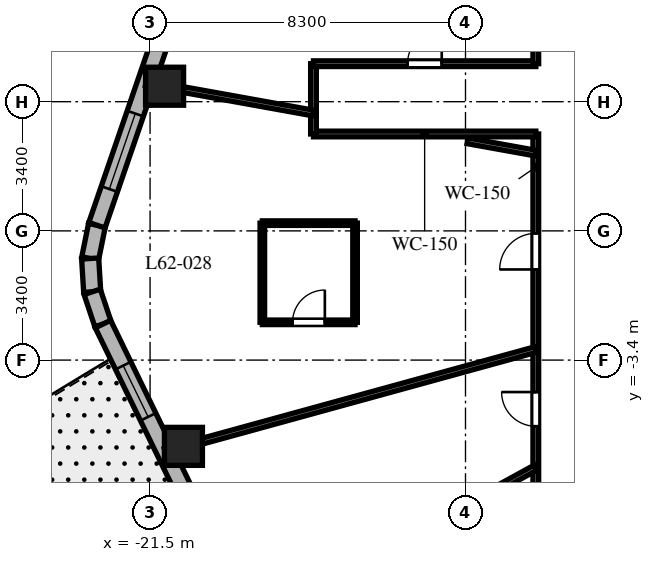
"""IFC4 building model, lengths in metres.
Left out: names, types, materials, properties, quantities, classifications, styles, units other than length and angle.
Written with IfcOpenShell. Run it as: python <this file> out.ifc"""

import sys

from ifc_helpers import new_model, si_unit, direction, frame, frame_2d, origin, origin_2d, place, context, subcontext, project, spatial, rectangle, extrude, element, fill, save


model = new_model("IFC4")
c1 = context("Model", 3, precision=1e-05, world=origin(), true_north=direction((0.0, 1.0)))
c2 = subcontext(c1, "Body", "Model", "MODEL_VIEW")
j1 = project(units=[si_unit("LENGTHUNIT", "METRE"), si_unit("PLANEANGLEUNIT", "RADIAN")], contexts=[c1])
p1 = place(None, origin())
s1 = spatial("IfcSite", under=j1, at=p1, CompositionType="ELEMENT")
p2 = place(p1, origin())
s2 = spatial("IfcBuilding", under=s1, at=p2, CompositionType="ELEMENT")
p3 = place(p2, frame((0.0, 0.0, 248.3)))
s3 = spatial("IfcBuildingStorey", under=s2, at=p3, CompositionType="ELEMENT", Elevation=248.3)
for number, where, z_axis, x_axis in (
    (1, (-21.118, 3.807, 0.0), (0.0, 0.0, 1.0), (1.0, 0.0, 0.0)),
    (2, (-20.622, -5.67, 0.0), (0.0, 0.0, 1.0), (1.0, 0.0, 0.0)),
):
    element("IfcColumn", number, at=place(p3, frame(where, z_axis=z_axis, x_axis=x_axis)), inside=s3, PredefinedType="COLUMN", context=c2, shape_type="SweptSolid", body=[
        extrude(rectangle(XDim=1.0, YDim=1.0, at=origin_2d()), origin(), (0.0, 0.0, 1.0), 3.8),
    ])
p4 = place(p3, frame((-22.898, 0.15, 0.0), z_axis=(0.0, 0.0, 1.0), x_axis=(-0.199055826889, -0.979988151858, 0.0)))
e3 = element("IfcWall", 3, at=p4, inside=s3, PredefinedType="SOLIDWALL", context=c2, shape_type="SweptSolid", body=[
    extrude(rectangle(XDim=0.894, YDim=0.45, at=frame_2d((0.447, 0.0))), origin(), (0.0, 0.0, 1.0), 3.5),
])
p5 = place(p3, frame((-23.076, -0.727, 0.0), z_axis=(0.0, 0.0, 1.0), x_axis=(0.060805222108, -0.998149650586, 0.0)))
e4 = element("IfcWall", 4, at=p5, inside=s3, PredefinedType="SOLIDWALL", context=c2, shape_type="SweptSolid", body=[
    extrude(rectangle(XDim=0.879, YDim=0.45, at=frame_2d((0.44, 0.0))), origin(), (0.0, 0.0, 1.0), 3.5),
])
p6 = place(p3, frame((-23.023, -1.604, 0.0), z_axis=(0.0, 0.0, 1.0), x_axis=(0.316801227695, -0.948491951537, 0.0)))
e5 = element("IfcWall", 5, at=p6, inside=s3, PredefinedType="SOLIDWALL", context=c2, shape_type="SweptSolid", body=[
    extrude(rectangle(XDim=0.894, YDim=0.45, at=frame_2d((0.447, 0.0))), origin(), (0.0, 0.0, 1.0), 3.5),
])
p7 = place(p3, frame((-16.324, 19.275, 0.0), z_axis=(0.0, 0.0, 1.0), x_axis=(-0.325083142304, -0.945685439557, 0.0)))
e6 = element("IfcWall", 6, at=p7, inside=s3, PredefinedType="SOLIDWALL", context=c2, shape_type="SweptSolid", body=[
    extrude(rectangle(XDim=20.224, YDim=0.45, at=frame_2d((10.112, 0.0))), origin(), (0.0, 0.0, 1.0), 3.5),
])
p8 = place(p7, frame((0.953, 0.0, 0.8)))
e7 = element("IfcOpeningElement", 7, at=p8, cuts=e6, PredefinedType="OPENING", context=c2, shape_type="SweptSolid", body=[
    extrude(rectangle(XDim=2.1, YDim=1.85, at=frame_2d((1.05, 0.925))), frame((0.0, 0.235, 0.0), z_axis=(0.0, -1.0, 0.0), x_axis=(1.0, 0.0, 0.0)), (0.0, 0.0, 1.0), 0.47),
])
p9 = place(p7, frame((6.268, 0.0, 0.8)))
e8 = element("IfcOpeningElement", 8, at=p9, cuts=e6, PredefinedType="OPENING", context=c2, shape_type="SweptSolid", body=[
    extrude(rectangle(XDim=2.1, YDim=1.85, at=frame_2d((1.05, 0.925))), frame((0.0, 0.235, 0.0), z_axis=(0.0, -1.0, 0.0), x_axis=(1.0, 0.0, 0.0)), (0.0, 0.0, 1.0), 0.47),
])
p10 = place(p7, frame((11.95, 0.0, 0.8)))
e9 = element("IfcOpeningElement", 9, at=p10, cuts=e6, PredefinedType="OPENING", context=c2, shape_type="SweptSolid", body=[
    extrude(rectangle(XDim=2.1, YDim=1.85, at=frame_2d((1.05, 0.925))), frame((0.0, 0.235, 0.0), z_axis=(0.0, -1.0, 0.0), x_axis=(1.0, 0.0, 0.0)), (0.0, 0.0, 1.0), 0.47),
])
p11 = place(p7, frame((17.118, 0.0, 0.8)))
e10 = element("IfcOpeningElement", 10, at=p11, cuts=e6, PredefinedType="OPENING", context=c2, shape_type="SweptSolid", body=[
    extrude(rectangle(XDim=2.1, YDim=1.85, at=frame_2d((1.05, 0.925))), frame((0.0, 0.235, 0.0), z_axis=(0.0, -1.0, 0.0), x_axis=(1.0, 0.0, 0.0)), (0.0, 0.0, 1.0), 0.47),
])
p12 = place(p3, frame((-22.74, -2.452, 0.0), z_axis=(0.0, 0.0, 1.0), x_axis=(0.437753424814, -0.899095066755, 0.0)))
e11 = element("IfcWall", 11, at=p12, inside=s3, PredefinedType="SOLIDWALL", context=c2, shape_type="SweptSolid", body=[
    extrude(rectangle(XDim=19.137, YDim=0.45, at=frame_2d((9.569, 0.0))), origin(), (0.0, 0.0, 1.0), 3.5),
])
p13 = place(p12, frame((4.763, 0.0, 0.0)))
e12 = element("IfcOpeningElement", 12, at=p13, cuts=e11, PredefinedType="OPENING", context=c2, shape_type="SweptSolid", body=[
    extrude(rectangle(XDim=0.95, YDim=2.15, at=frame_2d((0.475, 1.075))), frame((0.0, 0.235, 0.0), z_axis=(0.0, -1.0, 0.0), x_axis=(1.0, 0.0, 0.0)), (0.0, 0.0, 1.0), 0.47),
])
p14 = place(p12, frame((1.216, 0.0, 0.8)))
e13 = element("IfcOpeningElement", 13, at=p14, cuts=e11, PredefinedType="OPENING", context=c2, shape_type="SweptSolid", body=[
    extrude(rectangle(XDim=1.5, YDim=1.8, at=frame_2d((0.75, 0.9))), frame((0.0, 0.235, 0.0), z_axis=(0.0, -1.0, 0.0), x_axis=(1.0, 0.0, 0.0)), (0.0, 0.0, 1.0), 0.47),
])
p15 = place(p12, frame((6.461, 0.0, 0.8)))
e14 = element("IfcOpeningElement", 14, at=p15, cuts=e11, PredefinedType="OPENING", context=c2, shape_type="SweptSolid", body=[
    extrude(rectangle(XDim=1.5, YDim=1.8, at=frame_2d((0.75, 0.9))), frame((0.0, 0.235, 0.0), z_axis=(0.0, -1.0, 0.0), x_axis=(1.0, 0.0, 0.0)), (0.0, 0.0, 1.0), 0.47),
])
p16 = place(p12, frame((11.156, 0.0, 0.8)))
e15 = element("IfcOpeningElement", 15, at=p16, cuts=e11, PredefinedType="OPENING", context=c2, shape_type="SweptSolid", body=[
    extrude(rectangle(XDim=1.5, YDim=1.8, at=frame_2d((0.75, 0.9))), frame((0.0, 0.235, 0.0), z_axis=(0.0, -1.0, 0.0), x_axis=(1.0, 0.0, 0.0)), (0.0, 0.0, 1.0), 0.47),
])
p17 = place(p12, frame((16.473, 0.0, 0.8)))
e16 = element("IfcOpeningElement", 16, at=p17, cuts=e11, PredefinedType="OPENING", context=c2, shape_type="SweptSolid", body=[
    extrude(rectangle(XDim=1.5, YDim=1.8, at=frame_2d((0.75, 0.9))), frame((0.0, 0.235, 0.0), z_axis=(0.0, -1.0, 0.0), x_axis=(1.0, 0.0, 0.0)), (0.0, 0.0, 1.0), 0.47),
])
p18 = place(p3, frame((-11.35, -9.85, 0.0), z_axis=(0.0, 0.0, 1.0), x_axis=(0.0, 1.0, 0.0)))
e17 = element("IfcWall", 17, at=p18, inside=s3, PredefinedType="PARTITIONING", context=c2, shape_type="SweptSolid", body=[
    extrude(rectangle(XDim=12.4, YDim=0.15, at=frame_2d((6.2, 0.0))), origin(), (0.0, 0.0, 1.0), 2.99),
])
p19 = place(p18, frame((8.835, 0.0, 0.0)))
e18 = element("IfcOpeningElement", 18, at=p19, cuts=e17, PredefinedType="OPENING", context=c2, shape_type="SweptSolid", body=[
    extrude(rectangle(XDim=0.95, YDim=2.03, at=frame_2d((0.475, 1.015))), frame((0.0, 0.085, 0.0), z_axis=(0.0, -1.0, 0.0), x_axis=(1.0, 0.0, 0.0)), (0.0, 0.0, 1.0), 0.17),
])
p20 = place(p18, frame((4.709, 0.0, 0.0)))
e19 = element("IfcOpeningElement", 19, at=p20, cuts=e17, PredefinedType="OPENING", context=c2, shape_type="SweptSolid", body=[
    extrude(rectangle(XDim=0.9, YDim=2.03, at=frame_2d((0.45, 1.015))), frame((0.0, 0.085, 0.0), z_axis=(0.0, -1.0, 0.0), x_axis=(1.0, 0.0, 0.0)), (0.0, 0.0, 1.0), 0.17),
])
p21 = place(p18, frame((1.457, 0.0, 0.0)))
e20 = element("IfcOpeningElement", 20, at=p21, cuts=e17, PredefinedType="OPENING", context=c2, shape_type="SweptSolid", body=[
    extrude(rectangle(XDim=0.95, YDim=2.03, at=frame_2d((0.475, 1.015))), frame((0.0, 0.085, 0.0), z_axis=(0.0, -1.0, 0.0), x_axis=(1.0, 0.0, 0.0)), (0.0, 0.0, 1.0), 0.17),
])
p22 = place(p3, frame((-11.35, 2.55, 0.0), z_axis=(0.0, 0.0, 1.0), x_axis=(-1.0, 0.0, 0.0)))
e21 = element("IfcWall", 21, at=p22, inside=s3, PredefinedType="PARTITIONING", context=c2, shape_type="SweptSolid", body=[
    extrude(rectangle(XDim=5.85, YDim=0.15, at=frame_2d((2.925, 0.0))), origin(), (0.0, 0.0, 1.0), 2.94),
])
p23 = place(p3, frame((-17.2, 2.55, 0.0), z_axis=(0.0, 0.0, 1.0), x_axis=(0.0, 1.0, 0.0)))
e22 = element("IfcWall", 22, at=p23, inside=s3, PredefinedType="PARTITIONING", context=c2, shape_type="SweptSolid", body=[
    extrude(rectangle(XDim=1.85, YDim=0.15, at=frame_2d((0.925, 0.0))), origin(), (0.0, 0.0, 1.0), 2.94),
])
p24 = place(p3, frame((-17.2, 4.4, 0.0), z_axis=(0.0, 0.0, 1.0), x_axis=(1.0, 0.0, 0.0)))
e23 = element("IfcWall", 23, at=p24, inside=s3, PredefinedType="PARTITIONING", context=c2, shape_type="SweptSolid", body=[
    extrude(rectangle(XDim=5.85, YDim=0.15, at=frame_2d((2.925, 0.0))), origin(), (0.0, 0.0, 1.0), 2.94),
])
p25 = place(p24, frame((2.475, 0.0, 0.0)))
e24 = element("IfcOpeningElement", 24, at=p25, cuts=e23, PredefinedType="OPENING", context=c2, shape_type="SweptSolid", body=[
    extrude(rectangle(XDim=0.9, YDim=2.03, at=frame_2d((0.45, 1.015))), frame((0.0, 0.085, 0.0), z_axis=(0.0, -1.0, 0.0), x_axis=(1.0, 0.0, 0.0)), (0.0, 0.0, 1.0), 0.17),
])
p26 = place(p3, frame((-11.35, 4.4, 0.0), z_axis=(0.0, 0.0, 1.0), x_axis=(0.0, 1.0, 0.0)))
e25 = element("IfcWall", 25, at=p26, inside=s3, PredefinedType="PARTITIONING", context=c2, shape_type="SweptSolid", body=[
    extrude(rectangle(XDim=5.45, YDim=0.15, at=frame_2d((2.725, 0.0))), origin(), (0.0, 0.0, 1.0), 2.99),
])
p27 = place(p26, frame((2.694, 0.0, 0.0)))
e26 = element("IfcOpeningElement", 26, at=p27, cuts=e25, PredefinedType="OPENING", context=c2, shape_type="SweptSolid", body=[
    extrude(rectangle(XDim=0.95, YDim=2.03, at=frame_2d((0.475, 1.015))), frame((0.0, 0.085, 0.0), z_axis=(0.0, -1.0, 0.0), x_axis=(1.0, 0.0, 0.0)), (0.0, 0.0, 1.0), 0.17),
])
p28 = place(p3, frame((-11.35, 2.046, 0.0), z_axis=(0.0, 0.0, 1.0), x_axis=(-0.984127783205, 0.177461281195, 0.0)))
e27 = element("IfcWall", 27, at=p28, inside=s3, PredefinedType="PARTITIONING", context=c2, shape_type="SweptSolid", body=[
    extrude(rectangle(XDim=1.826, YDim=0.15, at=frame_2d((0.913, 0.0))), origin(), (0.0, 0.0, 1.0), 3.5),
])
p29 = place(p3, frame((-17.2, 3.101, 0.0), z_axis=(0.0, 0.0, 1.0), x_axis=(-0.98413465883, 0.177423147559, 0.0)))
e28 = element("IfcWall", 28, at=p29, inside=s3, PredefinedType="PARTITIONING", context=c2, shape_type="SweptSolid", body=[
    extrude(rectangle(XDim=4.482, YDim=0.15, at=frame_2d((2.241, 0.0))), origin(), (0.0, 0.0, 1.0), 2.74),
])
p30 = place(p3, frame((-11.35, -3.121, 0.0), z_axis=(0.0, 0.0, 1.0), x_axis=(-0.964212793822, -0.265129568758, 0.0)))
e29 = element("IfcWall", 29, at=p30, inside=s3, PredefinedType="PARTITIONING", context=c2, shape_type="SweptSolid", body=[
    extrude(rectangle(XDim=10.12, YDim=0.15, at=frame_2d((5.06, 0.0))), origin(), (0.0, 0.0, 1.0), 2.74),
])
p31 = place(p3, frame((-11.35, -6.227, 0.0), z_axis=(0.0, 0.0, 1.0), x_axis=(-0.876723190824, -0.480995266786, 0.0)))
e30 = element("IfcWall", 30, at=p31, inside=s3, PredefinedType="PARTITIONING", context=c2, shape_type="SweptSolid", body=[
    extrude(rectangle(XDim=8.598, YDim=0.15, at=frame_2d((4.299, 0.0))), origin(), (0.0, 0.0, 1.0), 2.74),
])
p32 = place(p3, frame((-18.546, -2.406, 0.0), z_axis=(0.0, 0.0, 1.0), x_axis=(1.0, 0.0, 0.0)))
e31 = element("IfcWall", 31, at=p32, inside=s3, PredefinedType="PARTITIONING", context=c2, shape_type="SweptSolid", body=[
    extrude(rectangle(XDim=2.44, YDim=0.12, at=frame_2d((1.22, 0.0))), origin(), (0.0, 0.0, 1.0), 2.94),
])
p33 = place(p32, frame((0.795, 0.0, 0.0)))
e32 = element("IfcOpeningElement", 32, at=p33, cuts=e31, PredefinedType="OPENING", context=c2, shape_type="SweptSolid", body=[
    extrude(rectangle(XDim=0.85, YDim=2.03, at=frame_2d((0.425, 1.015))), frame((0.0, 0.07, 0.0), z_axis=(0.0, -1.0, 0.0), x_axis=(1.0, 0.0, 0.0)), (0.0, 0.0, 1.0), 0.14),
])
p34 = place(p3, frame((-16.106, -2.406, 0.0), z_axis=(0.0, 0.0, 1.0), x_axis=(0.0, 1.0, 0.0)))
e33 = element("IfcWall", 33, at=p34, inside=s3, PredefinedType="PARTITIONING", context=c2, shape_type="SweptSolid", body=[
    extrude(rectangle(XDim=2.61, YDim=0.12, at=frame_2d((1.305, 0.0))), origin(), (0.0, 0.0, 1.0), 3.5),
])
p35 = place(p3, frame((-16.106, 0.204, 0.0), z_axis=(0.0, 0.0, 1.0), x_axis=(-1.0, 0.0, 0.0)))
e34 = element("IfcWall", 34, at=p35, inside=s3, PredefinedType="PARTITIONING", context=c2, shape_type="SweptSolid", body=[
    extrude(rectangle(XDim=2.44, YDim=0.12, at=frame_2d((1.22, 0.0))), origin(), (0.0, 0.0, 1.0), 2.94),
])
p36 = place(p3, frame((-18.546, 0.204, 0.0), z_axis=(0.0, 0.0, 1.0), x_axis=(0.0, -1.0, 0.0)))
e35 = element("IfcWall", 35, at=p36, inside=s3, PredefinedType="PARTITIONING", context=c2, shape_type="SweptSolid", body=[
    extrude(rectangle(XDim=2.61, YDim=0.12, at=frame_2d((1.305, 0.0))), origin(), (0.0, 0.0, 1.0), 3.5),
])
p37 = place(p11, origin())
e36 = element("IfcWindow", 36, at=p37, inside=s3, PartitioningType="SINGLE_PANEL", PredefinedType="WINDOW", context=c2, shape_type="SweptSolid", body=[
    extrude(rectangle(XDim=2.1, YDim=1.85, at=frame_2d((1.05, 0.925))), frame((0.0, 0.03, 0.0), z_axis=(0.0, -1.0, 0.0), x_axis=(1.0, 0.0, 0.0)), (0.0, 0.0, 1.0), 0.06),
])
fill(e10, e36)
p38 = place(p14, origin())
e37 = element("IfcWindow", 37, at=p38, inside=s3, PartitioningType="SINGLE_PANEL", PredefinedType="WINDOW", context=c2, shape_type="SweptSolid", body=[
    extrude(rectangle(XDim=1.5, YDim=1.8, at=frame_2d((0.75, 0.9))), frame((0.0, 0.03, 0.0), z_axis=(0.0, -1.0, 0.0), x_axis=(1.0, 0.0, 0.0)), (0.0, 0.0, 1.0), 0.06),
])
fill(e13, e37)
p39 = place(p25, origin())
e38 = element("IfcDoor", 38, at=p39, inside=s3, OperationType="SINGLE_SWING_RIGHT", PredefinedType="DOOR", context=c2, shape_type="SweptSolid", body=[
    extrude(rectangle(XDim=0.9, YDim=2.03, at=frame_2d((0.45, 1.015))), frame((0.0, 0.025, 0.0), z_axis=(0.0, -1.0, 0.0), x_axis=(1.0, 0.0, 0.0)), (0.0, 0.0, 1.0), 0.05),
])
fill(e24, e38)
p40 = place(p19, origin())
e39 = element("IfcDoor", 39, at=p40, inside=s3, OperationType="SINGLE_SWING_LEFT", PredefinedType="DOOR", context=c2, shape_type="SweptSolid", body=[
    extrude(rectangle(XDim=0.95, YDim=2.03, at=frame_2d((0.475, 1.015))), frame((0.0, 0.025, 0.0), z_axis=(0.0, -1.0, 0.0), x_axis=(1.0, 0.0, 0.0)), (0.0, 0.0, 1.0), 0.05),
])
fill(e18, e39)
p41 = place(p33, origin())
e40 = element("IfcDoor", 40, at=p41, inside=s3, OperationType="SINGLE_SWING_RIGHT", PredefinedType="DOOR", context=c2, shape_type="SweptSolid", body=[
    extrude(rectangle(XDim=0.85, YDim=2.03, at=frame_2d((0.425, 1.015))), frame((0.0, 0.025, 0.0), z_axis=(0.0, -1.0, 0.0), x_axis=(1.0, 0.0, 0.0)), (0.0, 0.0, 1.0), 0.05),
])
fill(e32, e40)
p42 = place(p20, origin())
e41 = element("IfcDoor", 41, at=p42, inside=s3, OperationType="SINGLE_SWING_RIGHT", PredefinedType="DOOR", context=c2, shape_type="SweptSolid", body=[
    extrude(rectangle(XDim=0.9, YDim=2.03, at=frame_2d((0.45, 1.015))), frame((0.0, 0.025, 0.0), z_axis=(0.0, -1.0, 0.0), x_axis=(1.0, 0.0, 0.0)), (0.0, 0.0, 1.0), 0.05),
])
fill(e19, e41)
save(model, sys.argv[1])
